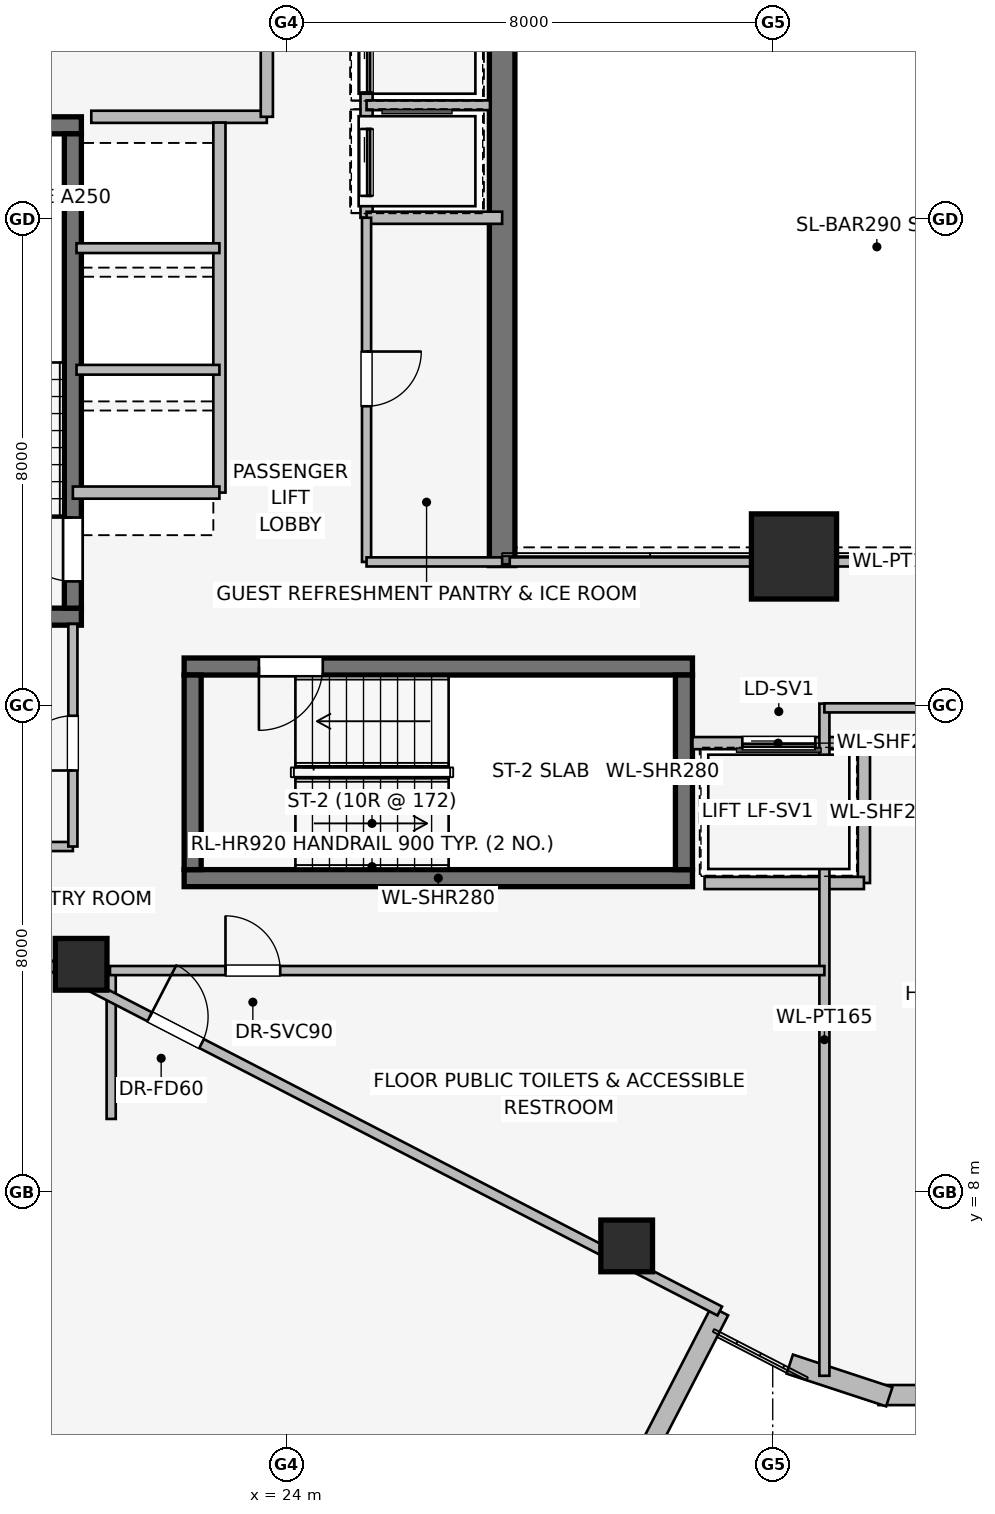
"""IFC4 building model, lengths in metres.
Left out: names, types, materials, properties, quantities, classifications, styles, units other than length and angle.
Written with IfcOpenShell. Run it as: python <this file> out.ifc"""

import sys

from ifc_helpers import new_model, si_unit, direction, frame, frame_2d, origin, origin_2d, place, context, subcontext, project, spatial, rectangle, extrude, element, fill, save


model = new_model("IFC4")
c1 = context("Model", 3, precision=1e-05, world=origin(), true_north=direction((0.0, 1.0)))
c2 = subcontext(c1, "Body", "Model", "MODEL_VIEW")
j1 = project(units=[si_unit("LENGTHUNIT", "METRE"), si_unit("PLANEANGLEUNIT", "RADIAN")], contexts=[c1])
p1 = place(None, origin())
s1 = spatial("IfcSite", under=j1, at=p1, CompositionType="ELEMENT")
p2 = place(p1, origin())
s2 = spatial("IfcBuilding", under=s1, at=p2, CompositionType="ELEMENT")
p3 = place(p2, frame((0.0, 0.0, 177.45)))
s3 = spatial("IfcBuildingStorey", under=s2, at=p3, CompositionType="ELEMENT", Elevation=177.45)
p4 = place(p3, frame((27.55, 29.55, 0.0), z_axis=(0.0, 0.0, 1.0), x_axis=(0.0, -1.0, 0.0)))
e1 = element("IfcWall", 1, at=p4, inside=s3, PredefinedType="SHEAR", context=c2, shape_type="SweptSolid", body=[
    extrude(rectangle(XDim=11.25, YDim=0.42, at=frame_2d((5.625, 0.0))), origin(), (0.0, 0.0, 1.0), 3.45),
])
for number, where, z_axis, x_axis in (
    (2, (16.87, 17.46, 0.0), (0.0, 0.0, 1.0), (1.0, 0.0, 0.0)),
    (3, (20.63, 25.54, 0.0), (0.0, 0.0, 1.0), (-1.0, 0.0, 0.0)),
):
    element("IfcWall", number, at=place(p3, frame(where, z_axis=z_axis, x_axis=x_axis)), inside=s3, PredefinedType="SHEAR", context=c2, shape_type="SweptSolid", body=[
        extrude(rectangle(XDim=3.76, YDim=0.28, at=frame_2d((1.88, 0.0))), origin(), (0.0, 0.0, 1.0), 3.45),
    ])
p5 = place(p3, frame((20.49, 17.6, 0.0), z_axis=(0.0, 0.0, 1.0), x_axis=(0.0, 1.0, 0.0)))
e4 = element("IfcWall", 4, at=p5, inside=s3, PredefinedType="SHEAR", context=c2, shape_type="SweptSolid", body=[
    extrude(rectangle(XDim=7.8, YDim=0.28, at=frame_2d((3.9, 0.0))), origin(), (0.0, 0.0, 1.0), 3.45),
])
p6 = place(p5, frame((0.44, 0.0, 0.0)))
e5 = element("IfcOpeningElement", 5, at=p6, cuts=e4, PredefinedType="OPENING", context=c2, shape_type="SweptSolid", body=[
    extrude(rectangle(XDim=1.05, YDim=2.0, at=frame_2d((0.525, 1.0))), frame((0.0, 0.15, 0.0), z_axis=(0.0, -1.0, 0.0), x_axis=(1.0, 0.0, 0.0)), (0.0, 0.0, 1.0), 0.3),
])
p7 = place(p3, frame((22.32, 13.16, 0.0), z_axis=(0.0, 0.0, 1.0), x_axis=(1.0, 0.0, 0.0)))
e6 = element("IfcWall", 6, at=p7, inside=s3, PredefinedType="SHEAR", context=c2, shape_type="SweptSolid", body=[
    extrude(rectangle(XDim=8.36, YDim=0.28, at=frame_2d((4.18, 0.0))), origin(), (0.0, 0.0, 1.0), 3.45),
])
p8 = place(p3, frame((30.68, 16.64, 0.0), z_axis=(0.0, 0.0, 1.0), x_axis=(-1.0, 0.0, 0.0)))
e7 = element("IfcWall", 7, at=p8, inside=s3, PredefinedType="SHEAR", context=c2, shape_type="SweptSolid", body=[
    extrude(rectangle(XDim=8.36, YDim=0.28, at=frame_2d((4.18, 0.0))), origin(), (0.0, 0.0, 1.0), 3.45),
])
p9 = place(p8, frame((6.08, 0.0, 0.0)))
e8 = element("IfcOpeningElement", 8, at=p9, cuts=e7, PredefinedType="OPENING", context=c2, shape_type="SweptSolid", body=[
    extrude(rectangle(XDim=1.05, YDim=2.0, at=frame_2d((0.525, 1.0))), frame((0.0, 0.15, 0.0), z_axis=(0.0, -1.0, 0.0), x_axis=(1.0, 0.0, 0.0)), (0.0, 0.0, 1.0), 0.3),
])
for number, where, z_axis, x_axis in (
    (9, (22.46, 16.5, 0.0), (0.0, 0.0, 1.0), (0.0, -1.0, 0.0)),
    (10, (30.54, 13.3, 0.0), (0.0, 0.0, 1.0), (0.0, 1.0, 0.0)),
):
    element("IfcWall", number, at=place(p3, frame(where, z_axis=z_axis, x_axis=x_axis)), inside=s3, PredefinedType="SHEAR", context=c2, shape_type="SweptSolid", body=[
        extrude(rectangle(XDim=3.2, YDim=0.28, at=frame_2d((1.6, 0.0))), origin(), (0.0, 0.0, 1.0), 3.45),
    ])
p10 = place(p3, frame((32.35, 18.45, 0.0), z_axis=(0.0, 0.0, 1.0), x_axis=(1.0, 0.0, 0.0)))
e11 = element("IfcColumn", 11, at=p10, inside=s3, PredefinedType="COLUMN", context=c2, shape_type="SweptSolid", body=[
    extrude(rectangle(XDim=1.4, YDim=1.4, at=origin_2d()), origin(), (0.0, 0.0, 1.0), 3.45),
])
for number, where, z_axis, x_axis in (
    (12, (20.626, 11.743, 0.0), (0.0, 0.0, 1.0), (1.0, 0.0, 0.0)),
    (13, (29.598, 7.112, 0.0), (0.0, 0.0, 1.0), (1.0, 0.0, 0.0)),
):
    element("IfcColumn", number, at=place(p3, frame(where, z_axis=z_axis, x_axis=x_axis)), inside=s3, PredefinedType="COLUMN", context=c2, shape_type="SweptSolid", body=[
        extrude(rectangle(XDim=0.85, YDim=0.85, at=origin_2d()), origin(), (0.0, 0.0, 1.0), 3.45),
    ])
p11 = place(p3, frame((31.129, 6.041, 0.0), z_axis=(0.0, 0.0, 1.0), x_axis=(-0.458626737826, -0.88862900884, 0.0)))
e14 = element("IfcWall", 14, at=p11, inside=s3, PredefinedType="STANDARD", context=c2, shape_type="SweptSolid", body=[
    extrude(rectangle(XDim=19.6, YDim=0.31, at=frame_2d((9.8, 0.0))), origin(), (0.0, 0.0, 1.0), 3.16),
])
p12 = place(p11, frame((2.633, 0.0, 0.75)))
e15 = element("IfcOpeningElement", 15, at=p12, cuts=e14, PredefinedType="OPENING", context=c2, shape_type="SweptSolid", body=[
    extrude(rectangle(XDim=2.0, YDim=1.5, at=frame_2d((1.0, 0.75))), frame((0.0, 0.165, 0.0), z_axis=(0.0, -1.0, 0.0), x_axis=(1.0, 0.0, 0.0)), (0.0, 0.0, 1.0), 0.33),
])
p13 = place(p11, frame((8.8, 0.0, 0.75)))
e16 = element("IfcOpeningElement", 16, at=p13, cuts=e14, PredefinedType="OPENING", context=c2, shape_type="SweptSolid", body=[
    extrude(rectangle(XDim=2.0, YDim=1.5, at=frame_2d((1.0, 0.75))), frame((0.0, 0.165, 0.0), z_axis=(0.0, -1.0, 0.0), x_axis=(1.0, 0.0, 0.0)), (0.0, 0.0, 1.0), 0.33),
])
p14 = place(p11, frame((14.967, 0.0, 0.75)))
e17 = element("IfcOpeningElement", 17, at=p14, cuts=e14, PredefinedType="OPENING", context=c2, shape_type="SweptSolid", body=[
    extrude(rectangle(XDim=2.0, YDim=1.5, at=frame_2d((1.0, 0.75))), frame((0.0, 0.165, 0.0), z_axis=(0.0, -1.0, 0.0), x_axis=(1.0, 0.0, 0.0)), (0.0, 0.0, 1.0), 0.33),
])
p15 = place(p3, frame((35.461, 4.659, 0.0), z_axis=(0.0, 0.0, 1.0), x_axis=(-1.0, 0.0, 0.0)))
e18 = element("IfcWall", 18, at=p15, inside=s3, PredefinedType="STANDARD", context=c2, shape_type="SweptSolid", body=[
    extrude(rectangle(XDim=1.722, YDim=0.33, at=frame_2d((0.861, 0.0))), origin(), (0.0, 0.0, 1.0), 3.16),
])
p16 = place(p3, frame((33.917, 4.63, 0.0), z_axis=(0.0, 0.0, 1.0), x_axis=(-0.949937416267, 0.312440242569, 0.0)))
e19 = element("IfcWall", 19, at=p16, inside=s3, PredefinedType="STANDARD", context=c2, shape_type="SweptSolid", body=[
    extrude(rectangle(XDim=1.722, YDim=0.33, at=frame_2d((0.861, 0.0))), origin(), (0.0, 0.0, 1.0), 3.16),
])
p17 = place(p3, frame((20.793, 25.68, 0.0), z_axis=(0.0, 0.0, 1.0), x_axis=(1.0, 0.0, 0.0)))
e20 = element("IfcWall", 20, at=p17, inside=s3, PredefinedType="PARTITIONING", context=c2, shape_type="SweptSolid", body=[
    extrude(rectangle(XDim=2.887, YDim=0.2, at=frame_2d((1.443, 0.0))), origin(), (0.0, 0.0, 1.0), 3.16),
])
p18 = place(p3, frame((23.68, 25.68, 0.0), z_axis=(0.0, 0.0, 1.0), x_axis=(0.0, 1.0, 0.0)))
e21 = element("IfcWall", 21, at=p18, inside=s3, PredefinedType="PARTITIONING", context=c2, shape_type="SweptSolid", body=[
    extrude(rectangle(XDim=5.54, YDim=0.2, at=frame_2d((2.77, 0.0))), origin(), (0.0, 0.0, 1.0), 3.16),
])
p19 = place(p18, frame((1.8, 0.0, 0.0)))
e22 = element("IfcOpeningElement", 22, at=p19, cuts=e21, PredefinedType="OPENING", context=c2, shape_type="SweptSolid", body=[
    extrude(rectangle(XDim=1.05, YDim=2.0, at=frame_2d((0.525, 1.0))), frame((0.0, 0.11, 0.0), z_axis=(0.0, -1.0, 0.0), x_axis=(1.0, 0.0, 0.0)), (0.0, 0.0, 1.0), 0.22),
])
p20 = place(p3, frame((33.5, 15.38, 0.0), z_axis=(0.0, 0.0, 1.0), x_axis=(-1.0, 0.0, 0.0)))
e23 = element("IfcWall", 23, at=p20, inside=s3, PredefinedType="PARTITIONING", context=c2, shape_type="SweptSolid", body=[
    extrude(rectangle(XDim=2.82, YDim=0.2, at=frame_2d((1.41, 0.0))), origin(), (0.0, 0.0, 1.0), 3.16),
])
p21 = place(p20, frame((0.8, 0.0, 0.0)))
e24 = element("IfcOpeningElement", 24, at=p21, cuts=e23, PredefinedType="OPENING", context=c2, shape_type="SweptSolid", body=[
    extrude(rectangle(XDim=1.2, YDim=2.2, at=frame_2d((0.6, 1.1))), frame((0.0, 0.11, 0.0), z_axis=(0.0, -1.0, 0.0), x_axis=(1.0, 0.0, 0.0)), (0.0, 0.0, 1.0), 0.22),
])
p22 = place(p3, frame((33.5, 13.08, 0.0), z_axis=(0.0, 0.0, 1.0), x_axis=(0.0, 1.0, 0.0)))
e25 = element("IfcWall", 25, at=p22, inside=s3, PredefinedType="PARTITIONING", context=c2, shape_type="SweptSolid", body=[
    extrude(rectangle(XDim=2.3, YDim=0.2, at=frame_2d((1.15, 0.0))), origin(), (0.0, 0.0, 1.0), 3.16),
])
p23 = place(p3, frame((30.879, 13.08, 0.0), z_axis=(0.0, 0.0, 1.0), x_axis=(1.0, 0.0, 0.0)))
e26 = element("IfcWall", 26, at=p23, inside=s3, PredefinedType="PARTITIONING", context=c2, shape_type="SweptSolid", body=[
    extrude(rectangle(XDim=2.621, YDim=0.2, at=frame_2d((1.311, 0.0))), origin(), (0.0, 0.0, 1.0), 3.16),
])
p24 = place(p3, frame((22.9, 19.5, 0.0), z_axis=(0.0, 0.0, 1.0), x_axis=(0.0, 1.0, 0.0)))
e27 = element("IfcWall", 27, at=p24, inside=s3, PredefinedType="PARTITIONING", context=c2, shape_type="SweptSolid", body=[
    extrude(rectangle(XDim=6.085, YDim=0.2, at=frame_2d((3.042, 0.0))), origin(), (0.0, 0.0, 1.0), 3.16),
])
p25 = place(p3, frame((20.49, 19.5, 0.0), z_axis=(0.0, 0.0, 1.0), x_axis=(1.0, 0.0, 0.0)))
e28 = element("IfcWall", 28, at=p25, inside=s3, PredefinedType="PARTITIONING", context=c2, shape_type="SweptSolid", body=[
    extrude(rectangle(XDim=2.41, YDim=0.2, at=frame_2d((1.205, 0.0))), origin(), (0.0, 0.0, 1.0), 2.06),
])
for number, where, z_axis, x_axis in (
    (29, (20.55, 21.52, 0.0), (0.0, 0.0, 1.0), (1.0, 0.0, 0.0)),
    (30, (20.55, 23.52, 0.0), (0.0, 0.0, 1.0), (1.0, 0.0, 0.0)),
):
    element("IfcWall", number, at=place(p3, frame(where, z_axis=z_axis, x_axis=x_axis)), inside=s3, PredefinedType="PARTITIONING", context=c2, shape_type="SweptSolid", body=[
        extrude(rectangle(XDim=2.35, YDim=0.16, at=frame_2d((1.175, 0.0))), origin(), (0.0, 0.0, 1.0), 3.16),
    ])
p26 = place(p3, frame((25.32, 29.55, 0.0), z_axis=(0.0, 0.0, 1.0), x_axis=(0.0, -1.0, 0.0)))
e31 = element("IfcWall", 31, at=p26, inside=s3, PredefinedType="PARTITIONING", context=c2, shape_type="SweptSolid", body=[
    extrude(rectangle(XDim=5.53, YDim=0.2, at=frame_2d((2.765, 0.0))), origin(), (0.0, 0.0, 1.0), 3.16),
])
p27 = place(p26, frame((0.52, 0.0, 0.0)))
e32 = element("IfcOpeningElement", 32, at=p27, cuts=e31, PredefinedType="OPENING", context=c2, shape_type="SweptSolid", body=[
    extrude(rectangle(XDim=1.1, YDim=2.2, at=frame_2d((0.55, 1.1))), frame((0.0, 0.11, 0.0), z_axis=(0.0, -1.0, 0.0), x_axis=(1.0, 0.0, 0.0)), (0.0, 0.0, 1.0), 0.22),
])
p28 = place(p26, frame((2.37, 0.0, 0.0)))
e33 = element("IfcOpeningElement", 33, at=p28, cuts=e31, PredefinedType="OPENING", context=c2, shape_type="SweptSolid", body=[
    extrude(rectangle(XDim=1.1, YDim=2.2, at=frame_2d((0.55, 1.1))), frame((0.0, 0.11, 0.0), z_axis=(0.0, -1.0, 0.0), x_axis=(1.0, 0.0, 0.0)), (0.0, 0.0, 1.0), 0.22),
])
p29 = place(p26, frame((4.07, 0.0, 0.0)))
e34 = element("IfcOpeningElement", 34, at=p29, cuts=e31, PredefinedType="OPENING", context=c2, shape_type="SweptSolid", body=[
    extrude(rectangle(XDim=1.1, YDim=2.2, at=frame_2d((0.55, 1.1))), frame((0.0, 0.11, 0.0), z_axis=(0.0, -1.0, 0.0), x_axis=(1.0, 0.0, 0.0)), (0.0, 0.0, 1.0), 0.22),
])
p30 = place(p3, frame((25.32, 24.02, 0.0), z_axis=(0.0, 0.0, 1.0), x_axis=(1.0, 0.0, 0.0)))
e35 = element("IfcWall", 35, at=p30, inside=s3, PredefinedType="PARTITIONING", context=c2, shape_type="SweptSolid", body=[
    extrude(rectangle(XDim=2.23, YDim=0.2, at=frame_2d((1.115, 0.0))), origin(), (0.0, 0.0, 1.0), 3.16),
])
p31 = place(p3, frame((25.32, 25.87, 0.0), z_axis=(0.0, 0.0, 1.0), x_axis=(1.0, 0.0, 0.0)))
e36 = element("IfcWall", 36, at=p31, inside=s3, PredefinedType="PARTITIONING", context=c2, shape_type="SweptSolid", body=[
    extrude(rectangle(XDim=2.03, YDim=0.16, at=frame_2d((1.015, 0.0))), origin(), (0.0, 0.0, 1.0), 3.16),
])
p32 = place(p3, frame((25.32, 24.02, 0.0), z_axis=(0.0, 0.0, 1.0), x_axis=(0.0, -1.0, 0.0)))
e37 = element("IfcWall", 37, at=p32, inside=s3, PredefinedType="PARTITIONING", context=c2, shape_type="SweptSolid", body=[
    extrude(rectangle(XDim=5.66, YDim=0.15, at=frame_2d((2.83, 0.0))), origin(), (0.0, 0.0, 1.0), 3.16),
])
p33 = place(p32, frame((2.2, 0.0, 0.0)))
e38 = element("IfcOpeningElement", 38, at=p33, cuts=e37, PredefinedType="OPENING", context=c2, shape_type="SweptSolid", body=[
    extrude(rectangle(XDim=0.9, YDim=2.0, at=frame_2d((0.45, 1.0))), frame((0.0, 0.085, 0.0), z_axis=(0.0, -1.0, 0.0), x_axis=(1.0, 0.0, 0.0)), (0.0, 0.0, 1.0), 0.17),
])
p34 = place(p3, frame((25.32, 18.36, 0.0), z_axis=(0.0, 0.0, 1.0), x_axis=(1.0, 0.0, 0.0)))
e39 = element("IfcWall", 39, at=p34, inside=s3, PredefinedType="PARTITIONING", context=c2, shape_type="SweptSolid", body=[
    extrude(rectangle(XDim=2.23, YDim=0.15, at=frame_2d((1.115, 0.0))), origin(), (0.0, 0.0, 1.0), 3.16),
])
p35 = place(p3, frame((18.1, 13.68, 0.0), z_axis=(0.0, 0.0, 1.0), x_axis=(1.0, 0.0, 0.0)))
e40 = element("IfcWall", 40, at=p35, inside=s3, PredefinedType="PARTITIONING", context=c2, shape_type="SweptSolid", body=[
    extrude(rectangle(XDim=2.39, YDim=0.15, at=frame_2d((1.195, 0.0))), origin(), (0.0, 0.0, 1.0), 3.16),
])
p36 = place(p3, frame((20.49, 13.68, 0.0), z_axis=(0.0, 0.0, 1.0), x_axis=(0.0, 1.0, 0.0)))
e41 = element("IfcWall", 41, at=p36, inside=s3, PredefinedType="PARTITIONING", context=c2, shape_type="SweptSolid", body=[
    extrude(rectangle(XDim=3.66, YDim=0.15, at=frame_2d((1.83, 0.0))), origin(), (0.0, 0.0, 1.0), 3.16),
])
p37 = place(p36, frame((1.25, 0.0, 0.0)))
e42 = element("IfcOpeningElement", 42, at=p37, cuts=e41, PredefinedType="OPENING", context=c2, shape_type="SweptSolid", body=[
    extrude(rectangle(XDim=0.9, YDim=2.0, at=frame_2d((0.45, 1.0))), frame((0.0, 0.085, 0.0), z_axis=(0.0, -1.0, 0.0), x_axis=(1.0, 0.0, 0.0)), (0.0, 0.0, 1.0), 0.17),
])
p38 = place(p3, frame((27.675, 18.36, 0.0), z_axis=(0.0, 0.0, 1.0), x_axis=(1.0, 0.0, 0.0)))
e43 = element("IfcWall", 43, at=p38, inside=s3, PredefinedType="PARTITIONING", context=c2, shape_type="SweptSolid", body=[
    extrude(rectangle(XDim=12.165, YDim=0.15, at=frame_2d((6.083, 0.0))), origin(), (0.0, 0.0, 1.0), 2.301),
])
p39 = place(p3, frame((21.12, 9.2, 0.0), z_axis=(0.0, 0.0, 1.0), x_axis=(0.0, 1.0, 0.0)))
e44 = element("IfcWall", 44, at=p39, inside=s3, PredefinedType="PARTITIONING", context=c2, shape_type="SweptSolid", body=[
    extrude(rectangle(XDim=2.48, YDim=0.15, at=frame_2d((1.24, 0.0))), origin(), (0.0, 0.0, 1.0), 3.16),
])
p40 = place(p3, frame((32.85, 4.976, 0.0), z_axis=(0.0, 0.0, 1.0), x_axis=(0.0, 1.0, 0.0)))
e45 = element("IfcWall", 45, at=p40, inside=s3, PredefinedType="PARTITIONING", context=c2, shape_type="SweptSolid", body=[
    extrude(rectangle(XDim=11.054, YDim=0.165, at=frame_2d((5.527, 0.0))), origin(), (0.0, 0.0, 1.0), 3.16),
])
p41 = place(p3, frame((21.1, 11.64, 0.0), z_axis=(0.0, 0.0, 1.0), x_axis=(1.0, 0.0, 0.0)))
e46 = element("IfcWall", 46, at=p41, inside=s3, PredefinedType="PARTITIONING", context=c2, shape_type="SweptSolid", body=[
    extrude(rectangle(XDim=11.75, YDim=0.15, at=frame_2d((5.875, 0.0))), origin(), (0.0, 0.0, 1.0), 3.16),
])
p42 = place(p41, frame((1.9, 0.0, 0.0)))
e47 = element("IfcOpeningElement", 47, at=p42, cuts=e46, PredefinedType="OPENING", context=c2, shape_type="SweptSolid", body=[
    extrude(rectangle(XDim=0.9, YDim=2.0, at=frame_2d((0.45, 1.0))), frame((0.0, 0.085, 0.0), z_axis=(0.0, -1.0, 0.0), x_axis=(1.0, 0.0, 0.0)), (0.0, 0.0, 1.0), 0.17),
])
p43 = place(p3, frame((32.85, 15.96, 0.0), z_axis=(0.0, 0.0, 1.0), x_axis=(1.0, 0.0, 0.0)))
e48 = element("IfcWall", 48, at=p43, inside=s3, PredefinedType="PARTITIONING", context=c2, shape_type="SweptSolid", body=[
    extrude(rectangle(XDim=9.276, YDim=0.15, at=frame_2d((4.638, 0.0))), origin(), (0.0, 0.0, 1.0), 3.16),
])
p44 = place(p43, frame((4.158, 0.0, 0.0)))
e49 = element("IfcOpeningElement", 49, at=p44, cuts=e48, PredefinedType="OPENING", context=c2, shape_type="SweptSolid", body=[
    extrude(rectangle(XDim=0.96, YDim=2.0, at=frame_2d((0.48, 1.0))), frame((0.0, 0.085, 0.0), z_axis=(0.0, -1.0, 0.0), x_axis=(1.0, 0.0, 0.0)), (0.0, 0.0, 1.0), 0.17),
])
p45 = place(p3, frame((18.866, 12.37, 0.0), z_axis=(0.0, 0.0, 1.0), x_axis=(0.888625308836, -0.458633906832, 0.0)))
e50 = element("IfcWall", 50, at=p45, inside=s3, PredefinedType="PARTITIONING", context=c2, shape_type="SweptSolid", body=[
    extrude(rectangle(XDim=13.8, YDim=0.165, at=frame_2d((6.9, 0.0))), origin(), (0.0, 0.0, 1.0), 2.611),
])
p46 = place(p45, frame((3.25, 0.0, 0.0)))
e51 = element("IfcOpeningElement", 51, at=p46, cuts=e50, PredefinedType="OPENING", context=c2, shape_type="SweptSolid", body=[
    extrude(rectangle(XDim=0.96, YDim=2.0, at=frame_2d((0.48, 1.0))), frame((0.0, 0.093, 0.0), z_axis=(0.0, -1.0, 0.0), x_axis=(1.0, 0.0, 0.0)), (0.0, 0.0, 1.0), 0.185),
])
p47 = place(p6, origin())
e52 = element("IfcDoor", 52, at=p47, inside=s3, OperationType="SINGLE_SWING_RIGHT", PredefinedType="DOOR", context=c2, shape_type="SweptSolid", body=[
    extrude(rectangle(XDim=1.05, YDim=2.0, at=frame_2d((0.525, 1.0))), frame((0.0, 0.025, 0.0), z_axis=(0.0, -1.0, 0.0), x_axis=(1.0, 0.0, 0.0)), (0.0, 0.0, 1.0), 0.05),
])
fill(e5, e52)
p48 = place(p9, origin())
e53 = element("IfcDoor", 53, at=p48, inside=s3, OperationType="SINGLE_SWING_RIGHT", PredefinedType="DOOR", context=c2, shape_type="SweptSolid", body=[
    extrude(rectangle(XDim=1.05, YDim=2.0, at=frame_2d((0.525, 1.0))), frame((0.0, 0.025, 0.0), z_axis=(0.0, -1.0, 0.0), x_axis=(1.0, 0.0, 0.0)), (0.0, 0.0, 1.0), 0.05),
])
fill(e8, e53)
p49 = place(p21, origin())
e54 = element("IfcDoor", 54, at=p49, inside=s3, OperationType="SLIDING_TO_RIGHT", PredefinedType="DOOR", context=c2, shape_type="SweptSolid", body=[
    extrude(rectangle(XDim=1.2, YDim=2.2, at=frame_2d((0.6, 1.1))), frame((0.0, 0.025, 0.0), z_axis=(0.0, -1.0, 0.0), x_axis=(1.0, 0.0, 0.0)), (0.0, 0.0, 1.0), 0.05),
])
fill(e24, e54)
p50 = place(p28, origin())
e55 = element("IfcDoor", 55, at=p50, inside=s3, OperationType="SLIDING_TO_LEFT", PredefinedType="DOOR", context=c2, shape_type="SweptSolid", body=[
    extrude(rectangle(XDim=1.1, YDim=2.2, at=frame_2d((0.55, 1.1))), frame((0.0, 0.025, 0.0), z_axis=(0.0, -1.0, 0.0), x_axis=(1.0, 0.0, 0.0)), (0.0, 0.0, 1.0), 0.05),
])
fill(e33, e55)
p51 = place(p29, origin())
e56 = element("IfcDoor", 56, at=p51, inside=s3, OperationType="SLIDING_TO_LEFT", PredefinedType="DOOR", context=c2, shape_type="SweptSolid", body=[
    extrude(rectangle(XDim=1.1, YDim=2.2, at=frame_2d((0.55, 1.1))), frame((0.0, 0.025, 0.0), z_axis=(0.0, -1.0, 0.0), x_axis=(1.0, 0.0, 0.0)), (0.0, 0.0, 1.0), 0.05),
])
fill(e34, e56)
p52 = place(p33, origin())
e57 = element("IfcDoor", 57, at=p52, inside=s3, OperationType="SINGLE_SWING_LEFT", PredefinedType="DOOR", context=c2, shape_type="SweptSolid", body=[
    extrude(rectangle(XDim=0.9, YDim=2.0, at=frame_2d((0.45, 1.0))), frame((0.0, 0.025, 0.0), z_axis=(0.0, -1.0, 0.0), x_axis=(1.0, 0.0, 0.0)), (0.0, 0.0, 1.0), 0.05),
])
fill(e38, e57)
p53 = place(p37, origin())
e58 = element("IfcDoor", 58, at=p53, inside=s3, OperationType="SINGLE_SWING_LEFT", PredefinedType="DOOR", context=c2, shape_type="SweptSolid", body=[
    extrude(rectangle(XDim=0.9, YDim=2.0, at=frame_2d((0.45, 1.0))), frame((0.0, 0.025, 0.0), z_axis=(0.0, -1.0, 0.0), x_axis=(1.0, 0.0, 0.0)), (0.0, 0.0, 1.0), 0.05),
])
fill(e42, e58)
p54 = place(p42, origin())
e59 = element("IfcDoor", 59, at=p54, inside=s3, OperationType="SINGLE_SWING_LEFT", PredefinedType="DOOR", context=c2, shape_type="SweptSolid", body=[
    extrude(rectangle(XDim=0.9, YDim=2.0, at=frame_2d((0.45, 1.0))), frame((0.0, 0.025, 0.0), z_axis=(0.0, -1.0, 0.0), x_axis=(1.0, 0.0, 0.0)), (0.0, 0.0, 1.0), 0.05),
])
fill(e47, e59)
p55 = place(p46, origin())
e60 = element("IfcDoor", 60, at=p55, inside=s3, OperationType="SINGLE_SWING_LEFT", PredefinedType="DOOR", context=c2, shape_type="SweptSolid", body=[
    extrude(rectangle(XDim=0.96, YDim=2.0, at=frame_2d((0.48, 1.0))), frame((0.0, 0.025, 0.0), z_axis=(0.0, -1.0, 0.0), x_axis=(1.0, 0.0, 0.0)), (0.0, 0.0, 1.0), 0.05),
])
fill(e51, e60)
save(model, sys.argv[1])
